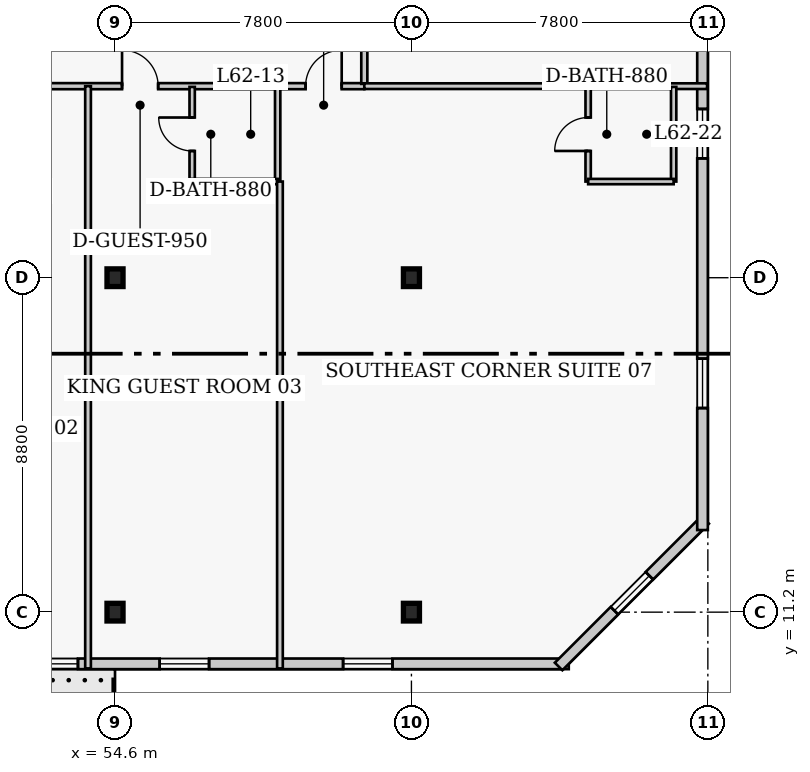
"""IFC4 building model, lengths in metres.
Left out: names, types, materials, properties, quantities, classifications, styles, units other than length and angle.
Written with IfcOpenShell. Run it as: python <this file> out.ifc"""

import sys

from ifc_helpers import new_model, si_unit, direction, frame, frame_2d, origin, origin_2d, place, context, subcontext, project, spatial, rectangle, i_section, extrude, element, fill, save


model = new_model("IFC4")
c1 = context("Model", 3, precision=1e-05, world=origin(), true_north=direction((0.0, 1.0)))
c2 = subcontext(c1, "Body", "Model", "MODEL_VIEW")
j1 = project(units=[si_unit("LENGTHUNIT", "METRE"), si_unit("PLANEANGLEUNIT", "RADIAN")], contexts=[c1])
p1 = place(None, origin())
s1 = spatial("IfcSite", under=j1, at=p1, CompositionType="ELEMENT")
p2 = place(p1, origin())
s2 = spatial("IfcBuilding", under=s1, at=p2, CompositionType="ELEMENT")
p3 = place(p2, frame((0.0, 0.0, 249.4)))
s3 = spatial("IfcBuildingStorey", under=s2, at=p3, CompositionType="ELEMENT", Elevation=249.4)
for number, where, z_axis, x_axis in (
    (1, (54.6, 11.2, 0.0), (0.0, 0.0, 1.0), (1.0, 0.0, 0.0)),
    (2, (54.6, 20.0, 0.0), (0.0, 0.0, 1.0), (1.0, 0.0, 0.0)),
    (3, (62.4, 11.2, 0.0), (0.0, 0.0, 1.0), (1.0, 0.0, 0.0)),
    (4, (62.4, 20.0, 0.0), (0.0, 0.0, 1.0), (1.0, 0.0, 0.0)),
):
    element("IfcColumn", number, at=place(p3, frame(where, z_axis=z_axis, x_axis=x_axis)), inside=s3, PredefinedType="COLUMN", context=c2, shape_type="SweptSolid", body=[
        extrude(i_section(OverallWidth=0.422, OverallDepth=0.465, WebThickness=0.045, FlangeThickness=0.073, FilletRadius=0.017, at=origin_2d()), origin(), (0.0, 0.0, 1.0), 4.0),
    ])
p4 = place(p3, frame((41.71, 9.84, 0.0), z_axis=(0.0, 0.0, 1.0), x_axis=(1.0, 0.0, 0.0)))
e5 = element("IfcWall", 5, at=p4, inside=s3, PredefinedType="SOLIDWALL", context=c2, shape_type="SweptSolid", body=[
    extrude(rectangle(XDim=24.83, YDim=0.28, at=frame_2d((12.415, 0.0))), origin(), (0.0, 0.0, 1.0), 3.76),
])
p5 = place(p4, frame((8.29, 0.0, 0.0)))
e6 = element("IfcOpeningElement", 6, at=p5, cuts=e5, PredefinedType="OPENING", context=c2, shape_type="SweptSolid", body=[
    extrude(rectangle(XDim=1.4, YDim=2.15, at=frame_2d((0.7, 1.075))), frame((0.0, 0.15, 0.0), z_axis=(0.0, -1.0, 0.0), x_axis=(1.0, 0.0, 0.0)), (0.0, 0.0, 1.0), 0.3),
])
p6 = place(p4, frame((2.838, 0.0, 0.85)))
e7 = element("IfcOpeningElement", 7, at=p6, cuts=e5, PredefinedType="OPENING", context=c2, shape_type="SweptSolid", body=[
    extrude(rectangle(XDim=1.3, YDim=1.7, at=frame_2d((0.65, 0.85))), frame((0.0, 0.15, 0.0), z_axis=(0.0, -1.0, 0.0), x_axis=(1.0, 0.0, 0.0)), (0.0, 0.0, 1.0), 0.3),
])
p7 = place(p4, frame((10.615, 0.0, 0.85)))
e8 = element("IfcOpeningElement", 8, at=p7, cuts=e5, PredefinedType="OPENING", context=c2, shape_type="SweptSolid", body=[
    extrude(rectangle(XDim=1.3, YDim=1.7, at=frame_2d((0.65, 0.85))), frame((0.0, 0.15, 0.0), z_axis=(0.0, -1.0, 0.0), x_axis=(1.0, 0.0, 0.0)), (0.0, 0.0, 1.0), 0.3),
])
p8 = place(p4, frame((18.892, 0.0, 0.85)))
e9 = element("IfcOpeningElement", 9, at=p8, cuts=e5, PredefinedType="OPENING", context=c2, shape_type="SweptSolid", body=[
    extrude(rectangle(XDim=1.3, YDim=1.7, at=frame_2d((0.65, 0.85))), frame((0.0, 0.15, 0.0), z_axis=(0.0, -1.0, 0.0), x_axis=(1.0, 0.0, 0.0)), (0.0, 0.0, 1.0), 0.3),
])
p9 = place(p4, frame((14.065, 0.0, 0.85)))
e10 = element("IfcOpeningElement", 10, at=p9, cuts=e5, PredefinedType="OPENING", context=c2, shape_type="SweptSolid", body=[
    extrude(rectangle(XDim=1.3, YDim=1.7, at=frame_2d((0.65, 0.85))), frame((0.0, 0.15, 0.0), z_axis=(0.0, -1.0, 0.0), x_axis=(1.0, 0.0, 0.0)), (0.0, 0.0, 1.0), 0.3),
])
p10 = place(p3, frame((66.273, 9.771, 0.0), z_axis=(0.0, 0.0, 1.0), x_axis=(0.707129162587, 0.707084399077, 0.0)))
e11 = element("IfcWall", 11, at=p10, inside=s3, PredefinedType="SOLIDWALL", context=c2, shape_type="SweptSolid", body=[
    extrude(rectangle(XDim=5.454, YDim=0.28, at=frame_2d((2.727, 0.0))), origin(), (0.0, 0.0, 1.0), 3.76),
])
p11 = place(p10, frame((2.077, 0.0, 0.85)))
e12 = element("IfcOpeningElement", 12, at=p11, cuts=e11, PredefinedType="OPENING", context=c2, shape_type="SweptSolid", body=[
    extrude(rectangle(XDim=1.3, YDim=1.7, at=frame_2d((0.65, 0.85))), frame((0.0, 0.15, 0.0), z_axis=(0.0, -1.0, 0.0), x_axis=(1.0, 0.0, 0.0)), (0.0, 0.0, 1.0), 0.3),
])
p12 = place(p3, frame((70.06, 13.36, 0.0), z_axis=(0.0, 0.0, 1.0), x_axis=(0.0, 1.0, 0.0)))
e13 = element("IfcWall", 13, at=p12, inside=s3, PredefinedType="SOLIDWALL", context=c2, shape_type="SweptSolid", body=[
    extrude(rectangle(XDim=30.88, YDim=0.28, at=frame_2d((15.44, 0.0))), origin(), (0.0, 0.0, 1.0), 3.76),
])
p13 = place(p12, frame((3.21, 0.0, 0.85)))
e14 = element("IfcOpeningElement", 14, at=p13, cuts=e13, PredefinedType="OPENING", context=c2, shape_type="SweptSolid", body=[
    extrude(rectangle(XDim=1.3, YDim=1.7, at=frame_2d((0.65, 0.85))), frame((0.0, 0.15, 0.0), z_axis=(0.0, -1.0, 0.0), x_axis=(1.0, 0.0, 0.0)), (0.0, 0.0, 1.0), 0.3),
])
p14 = place(p12, frame((9.78, 0.0, 0.85)))
e15 = element("IfcOpeningElement", 15, at=p14, cuts=e13, PredefinedType="OPENING", context=c2, shape_type="SweptSolid", body=[
    extrude(rectangle(XDim=1.3, YDim=1.7, at=frame_2d((0.65, 0.85))), frame((0.0, 0.15, 0.0), z_axis=(0.0, -1.0, 0.0), x_axis=(1.0, 0.0, 0.0)), (0.0, 0.0, 1.0), 0.3),
])
p15 = place(p12, frame((18.65, 0.0, 0.85)))
e16 = element("IfcOpeningElement", 16, at=p15, cuts=e13, PredefinedType="OPENING", context=c2, shape_type="SweptSolid", body=[
    extrude(rectangle(XDim=1.3, YDim=1.7, at=frame_2d((0.65, 0.85))), frame((0.0, 0.15, 0.0), z_axis=(0.0, -1.0, 0.0), x_axis=(1.0, 0.0, 0.0)), (0.0, 0.0, 1.0), 0.3),
])
p16 = place(p12, frame((26.37, 0.0, 0.85)))
e17 = element("IfcOpeningElement", 17, at=p16, cuts=e13, PredefinedType="OPENING", context=c2, shape_type="SweptSolid", body=[
    extrude(rectangle(XDim=1.3, YDim=1.7, at=frame_2d((0.65, 0.85))), frame((0.0, 0.15, 0.0), z_axis=(0.0, -1.0, 0.0), x_axis=(1.0, 0.0, 0.0)), (0.0, 0.0, 1.0), 0.3),
])
p17 = place(p3, frame((35.8, 25.04, 0.0), z_axis=(0.0, 0.0, 1.0), x_axis=(1.0, 0.0, 0.0)))
e18 = element("IfcWall", 18, at=p17, inside=s3, PredefinedType="PARTITIONING", context=c2, shape_type="SweptSolid", body=[
    extrude(rectangle(XDim=25.36, YDim=0.16, at=frame_2d((12.68, 0.0))), origin(), (0.0, 0.0, 1.0), 3.76),
])
p18 = place(p17, frame((1.518, 0.0, 0.0)))
e19 = element("IfcOpeningElement", 19, at=p18, cuts=e18, PredefinedType="OPENING", context=c2, shape_type="SweptSolid", body=[
    extrude(rectangle(XDim=0.95, YDim=2.1, at=frame_2d((0.475, 1.05))), frame((0.0, 0.09, 0.0), z_axis=(0.0, -1.0, 0.0), x_axis=(1.0, 0.0, 0.0)), (0.0, 0.0, 1.0), 0.18),
])
p19 = place(p17, frame((9.278, 0.0, 0.0)))
e20 = element("IfcOpeningElement", 20, at=p19, cuts=e18, PredefinedType="OPENING", context=c2, shape_type="SweptSolid", body=[
    extrude(rectangle(XDim=1.0, YDim=2.15, at=frame_2d((0.5, 1.075))), frame((0.0, 0.09, 0.0), z_axis=(0.0, -1.0, 0.0), x_axis=(1.0, 0.0, 0.0)), (0.0, 0.0, 1.0), 0.18),
])
p20 = place(p17, frame((16.06, 0.0, 0.0)))
e21 = element("IfcOpeningElement", 21, at=p20, cuts=e18, PredefinedType="OPENING", context=c2, shape_type="SweptSolid", body=[
    extrude(rectangle(XDim=0.95, YDim=2.1, at=frame_2d((0.475, 1.05))), frame((0.0, 0.09, 0.0), z_axis=(0.0, -1.0, 0.0), x_axis=(1.0, 0.0, 0.0)), (0.0, 0.0, 1.0), 0.18),
])
p21 = place(p17, frame((18.985, 0.0, 0.0)))
e22 = element("IfcOpeningElement", 22, at=p21, cuts=e18, PredefinedType="OPENING", context=c2, shape_type="SweptSolid", body=[
    extrude(rectangle(XDim=0.95, YDim=2.1, at=frame_2d((0.475, 1.05))), frame((0.0, 0.09, 0.0), z_axis=(0.0, -1.0, 0.0), x_axis=(1.0, 0.0, 0.0)), (0.0, 0.0, 1.0), 0.18),
])
p22 = place(p17, frame((23.815, 0.0, 0.0)))
e23 = element("IfcOpeningElement", 23, at=p22, cuts=e18, PredefinedType="OPENING", context=c2, shape_type="SweptSolid", body=[
    extrude(rectangle(XDim=0.95, YDim=2.1, at=frame_2d((0.475, 1.05))), frame((0.0, 0.09, 0.0), z_axis=(0.0, -1.0, 0.0), x_axis=(1.0, 0.0, 0.0)), (0.0, 0.0, 1.0), 0.18),
])
p23 = place(p3, frame((61.16, 25.1, 0.0), z_axis=(0.0, 0.0, 1.0), x_axis=(0.0, 1.0, 0.0)))
e24 = element("IfcWall", 24, at=p23, inside=s3, PredefinedType="PARTITIONING", context=c2, shape_type="SweptSolid", body=[
    extrude(rectangle(XDim=15.55, YDim=0.16, at=frame_2d((7.775, 0.0))), origin(), (0.0, 0.0, 1.0), 3.76),
])
p24 = place(p23, frame((5.425, 0.0, 0.0)))
e25 = element("IfcOpeningElement", 25, at=p24, cuts=e24, PredefinedType="OPENING", context=c2, shape_type="SweptSolid", body=[
    extrude(rectangle(XDim=0.95, YDim=2.1, at=frame_2d((0.475, 1.05))), frame((0.0, 0.09, 0.0), z_axis=(0.0, -1.0, 0.0), x_axis=(1.0, 0.0, 0.0)), (0.0, 0.0, 1.0), 0.18),
])
p25 = place(p23, frame((14.11, 0.0, 0.0)))
e26 = element("IfcOpeningElement", 26, at=p25, cuts=e24, PredefinedType="OPENING", context=c2, shape_type="SweptSolid", body=[
    extrude(rectangle(XDim=1.0, YDim=2.15, at=frame_2d((0.5, 1.075))), frame((0.0, 0.09, 0.0), z_axis=(0.0, -1.0, 0.0), x_axis=(1.0, 0.0, 0.0)), (0.0, 0.0, 1.0), 0.18),
])
p26 = place(p3, frame((53.89, 9.72, 0.0), z_axis=(0.0, 0.0, 1.0), x_axis=(0.0, 1.0, 0.0)))
e27 = element("IfcWall", 27, at=p26, inside=s3, PredefinedType="PARTITIONING", context=c2, shape_type="SweptSolid", body=[
    extrude(rectangle(XDim=15.32, YDim=0.15, at=frame_2d((7.66, 0.0))), origin(), (0.0, 0.0, 1.0), 3.76),
])
p27 = place(p3, frame((56.63, 22.53, 0.0), z_axis=(0.0, 0.0, 1.0), x_axis=(0.0, 1.0, 0.0)))
e28 = element("IfcWall", 28, at=p27, inside=s3, PredefinedType="PLUMBINGWALL", context=c2, shape_type="SweptSolid", body=[
    extrude(rectangle(XDim=2.49, YDim=0.14, at=frame_2d((1.245, 0.0))), origin(), (0.0, 0.0, 1.0), 3.76),
])
p28 = place(p27, frame((0.805, 0.0, 0.0)))
e29 = element("IfcOpeningElement", 29, at=p28, cuts=e28, PredefinedType="OPENING", context=c2, shape_type="SweptSolid", body=[
    extrude(rectangle(XDim=0.88, YDim=2.05, at=frame_2d((0.44, 1.025))), frame((0.0, 0.08, 0.0), z_axis=(0.0, -1.0, 0.0), x_axis=(1.0, 0.0, 0.0)), (0.0, 0.0, 1.0), 0.16),
])
p29 = place(p3, frame((58.88, 22.53, 0.0), z_axis=(0.0, 0.0, 1.0), x_axis=(0.0, 1.0, 0.0)))
e30 = element("IfcWall", 30, at=p29, inside=s3, PredefinedType="PLUMBINGWALL", context=c2, shape_type="SweptSolid", body=[
    extrude(rectangle(XDim=2.49, YDim=0.14, at=frame_2d((1.245, 0.0))), origin(), (0.0, 0.0, 1.0), 3.76),
])
p30 = place(p3, frame((56.63, 22.53, 0.0), z_axis=(0.0, 0.0, 1.0), x_axis=(1.0, 0.0, 0.0)))
e31 = element("IfcWall", 31, at=p30, inside=s3, PredefinedType="PLUMBINGWALL", context=c2, shape_type="SweptSolid", body=[
    extrude(rectangle(XDim=2.25, YDim=0.14, at=frame_2d((1.125, 0.0))), origin(), (0.0, 0.0, 1.0), 3.76),
])
p31 = place(p3, frame((58.94, 9.72, 0.0), z_axis=(0.0, 0.0, 1.0), x_axis=(0.0, 1.0, 0.0)))
e32 = element("IfcWall", 32, at=p31, inside=s3, PredefinedType="PARTITIONING", context=c2, shape_type="SweptSolid", body=[
    extrude(rectangle(XDim=12.81, YDim=0.15, at=frame_2d((6.405, 0.0))), origin(), (0.0, 0.0, 1.0), 3.76),
])
p32 = place(p3, frame((61.16, 25.04, 0.0), z_axis=(0.0, 0.0, 1.0), x_axis=(1.0, 0.0, 0.0)))
e33 = element("IfcWall", 33, at=p32, inside=s3, PredefinedType="PARTITIONING", context=c2, shape_type="SweptSolid", body=[
    extrude(rectangle(XDim=9.02, YDim=0.15, at=frame_2d((4.51, 0.0))), origin(), (0.0, 0.0, 1.0), 3.76),
])
p33 = place(p3, frame((67.05, 22.53, 0.0), z_axis=(0.0, 0.0, 1.0), x_axis=(0.0, 1.0, 0.0)))
e34 = element("IfcWall", 34, at=p33, inside=s3, PredefinedType="PLUMBINGWALL", context=c2, shape_type="SweptSolid", body=[
    extrude(rectangle(XDim=2.49, YDim=0.14, at=frame_2d((1.245, 0.0))), origin(), (0.0, 0.0, 1.0), 3.76),
])
p34 = place(p33, frame((0.805, 0.0, 0.0)))
e35 = element("IfcOpeningElement", 35, at=p34, cuts=e34, PredefinedType="OPENING", context=c2, shape_type="SweptSolid", body=[
    extrude(rectangle(XDim=0.88, YDim=2.05, at=frame_2d((0.44, 1.025))), frame((0.0, 0.08, 0.0), z_axis=(0.0, -1.0, 0.0), x_axis=(1.0, 0.0, 0.0)), (0.0, 0.0, 1.0), 0.16),
])
p35 = place(p3, frame((69.3, 22.53, 0.0), z_axis=(0.0, 0.0, 1.0), x_axis=(0.0, 1.0, 0.0)))
e36 = element("IfcWall", 36, at=p35, inside=s3, PredefinedType="PLUMBINGWALL", context=c2, shape_type="SweptSolid", body=[
    extrude(rectangle(XDim=2.49, YDim=0.14, at=frame_2d((1.245, 0.0))), origin(), (0.0, 0.0, 1.0), 3.76),
])
p36 = place(p3, frame((67.05, 22.53, 0.0), z_axis=(0.0, 0.0, 1.0), x_axis=(1.0, 0.0, 0.0)))
e37 = element("IfcWall", 37, at=p36, inside=s3, PredefinedType="PLUMBINGWALL", context=c2, shape_type="SweptSolid", body=[
    extrude(rectangle(XDim=2.25, YDim=0.14, at=frame_2d((1.125, 0.0))), origin(), (0.0, 0.0, 1.0), 3.76),
])
p37 = place(p7, origin())
e38 = element("IfcWindow", 38, at=p37, inside=s3, PartitioningType="SINGLE_PANEL", PredefinedType="WINDOW", context=c2, shape_type="SweptSolid", body=[
    extrude(rectangle(XDim=1.3, YDim=1.7, at=frame_2d((0.65, 0.85))), frame((0.0, 0.03, 0.0), z_axis=(0.0, -1.0, 0.0), x_axis=(1.0, 0.0, 0.0)), (0.0, 0.0, 1.0), 0.06),
])
fill(e8, e38)
p38 = place(p8, origin())
e39 = element("IfcWindow", 39, at=p38, inside=s3, PartitioningType="SINGLE_PANEL", PredefinedType="WINDOW", context=c2, shape_type="SweptSolid", body=[
    extrude(rectangle(XDim=1.3, YDim=1.7, at=frame_2d((0.65, 0.85))), frame((0.0, 0.03, 0.0), z_axis=(0.0, -1.0, 0.0), x_axis=(1.0, 0.0, 0.0)), (0.0, 0.0, 1.0), 0.06),
])
fill(e9, e39)
p39 = place(p11, origin())
e40 = element("IfcWindow", 40, at=p39, inside=s3, PartitioningType="SINGLE_PANEL", PredefinedType="WINDOW", context=c2, shape_type="SweptSolid", body=[
    extrude(rectangle(XDim=1.3, YDim=1.7, at=frame_2d((0.65, 0.85))), frame((0.0, 0.03, 0.0), z_axis=(0.0, -1.0, 0.0), x_axis=(1.0, 0.0, 0.0)), (0.0, 0.0, 1.0), 0.06),
])
fill(e12, e40)
p40 = place(p13, origin())
e41 = element("IfcWindow", 41, at=p40, inside=s3, PartitioningType="SINGLE_PANEL", PredefinedType="WINDOW", context=c2, shape_type="SweptSolid", body=[
    extrude(rectangle(XDim=1.3, YDim=1.7, at=frame_2d((0.65, 0.85))), frame((0.0, 0.03, 0.0), z_axis=(0.0, -1.0, 0.0), x_axis=(1.0, 0.0, 0.0)), (0.0, 0.0, 1.0), 0.06),
])
fill(e14, e41)
p41 = place(p14, origin())
e42 = element("IfcWindow", 42, at=p41, inside=s3, PartitioningType="SINGLE_PANEL", PredefinedType="WINDOW", context=c2, shape_type="SweptSolid", body=[
    extrude(rectangle(XDim=1.3, YDim=1.7, at=frame_2d((0.65, 0.85))), frame((0.0, 0.03, 0.0), z_axis=(0.0, -1.0, 0.0), x_axis=(1.0, 0.0, 0.0)), (0.0, 0.0, 1.0), 0.06),
])
fill(e15, e42)
p42 = place(p9, origin())
e43 = element("IfcWindow", 43, at=p42, inside=s3, PartitioningType="SINGLE_PANEL", PredefinedType="WINDOW", context=c2, shape_type="SweptSolid", body=[
    extrude(rectangle(XDim=1.3, YDim=1.7, at=frame_2d((0.65, 0.85))), frame((0.0, 0.03, 0.0), z_axis=(0.0, -1.0, 0.0), x_axis=(1.0, 0.0, 0.0)), (0.0, 0.0, 1.0), 0.06),
])
fill(e10, e43)
p43 = place(p28, origin())
e44 = element("IfcDoor", 44, at=p43, inside=s3, OperationType="SINGLE_SWING_RIGHT", PredefinedType="DOOR", context=c2, shape_type="SweptSolid", body=[
    extrude(rectangle(XDim=0.88, YDim=2.05, at=frame_2d((0.44, 1.025))), frame((0.0, 0.025, 0.0), z_axis=(0.0, -1.0, 0.0), x_axis=(1.0, 0.0, 0.0)), (0.0, 0.0, 1.0), 0.05),
])
fill(e29, e44)
p44 = place(p21, origin())
e45 = element("IfcDoor", 45, at=p44, inside=s3, OperationType="SINGLE_SWING_LEFT", PredefinedType="DOOR", context=c2, shape_type="SweptSolid", body=[
    extrude(rectangle(XDim=0.95, YDim=2.1, at=frame_2d((0.475, 1.05))), frame((0.0, 0.025, 0.0), z_axis=(0.0, -1.0, 0.0), x_axis=(1.0, 0.0, 0.0)), (0.0, 0.0, 1.0), 0.05),
])
fill(e22, e45)
p45 = place(p34, origin())
e46 = element("IfcDoor", 46, at=p45, inside=s3, OperationType="SINGLE_SWING_LEFT", PredefinedType="DOOR", context=c2, shape_type="SweptSolid", body=[
    extrude(rectangle(XDim=0.88, YDim=2.05, at=frame_2d((0.44, 1.025))), frame((0.0, 0.025, 0.0), z_axis=(0.0, -1.0, 0.0), x_axis=(1.0, 0.0, 0.0)), (0.0, 0.0, 1.0), 0.05),
])
fill(e35, e46)
p46 = place(p22, origin())
e47 = element("IfcDoor", 47, at=p46, inside=s3, OperationType="SINGLE_SWING_RIGHT", PredefinedType="DOOR", context=c2, shape_type="SweptSolid", body=[
    extrude(rectangle(XDim=0.95, YDim=2.1, at=frame_2d((0.475, 1.05))), frame((0.0, 0.025, 0.0), z_axis=(0.0, -1.0, 0.0), x_axis=(1.0, 0.0, 0.0)), (0.0, 0.0, 1.0), 0.05),
])
fill(e23, e47)
save(model, sys.argv[1])
